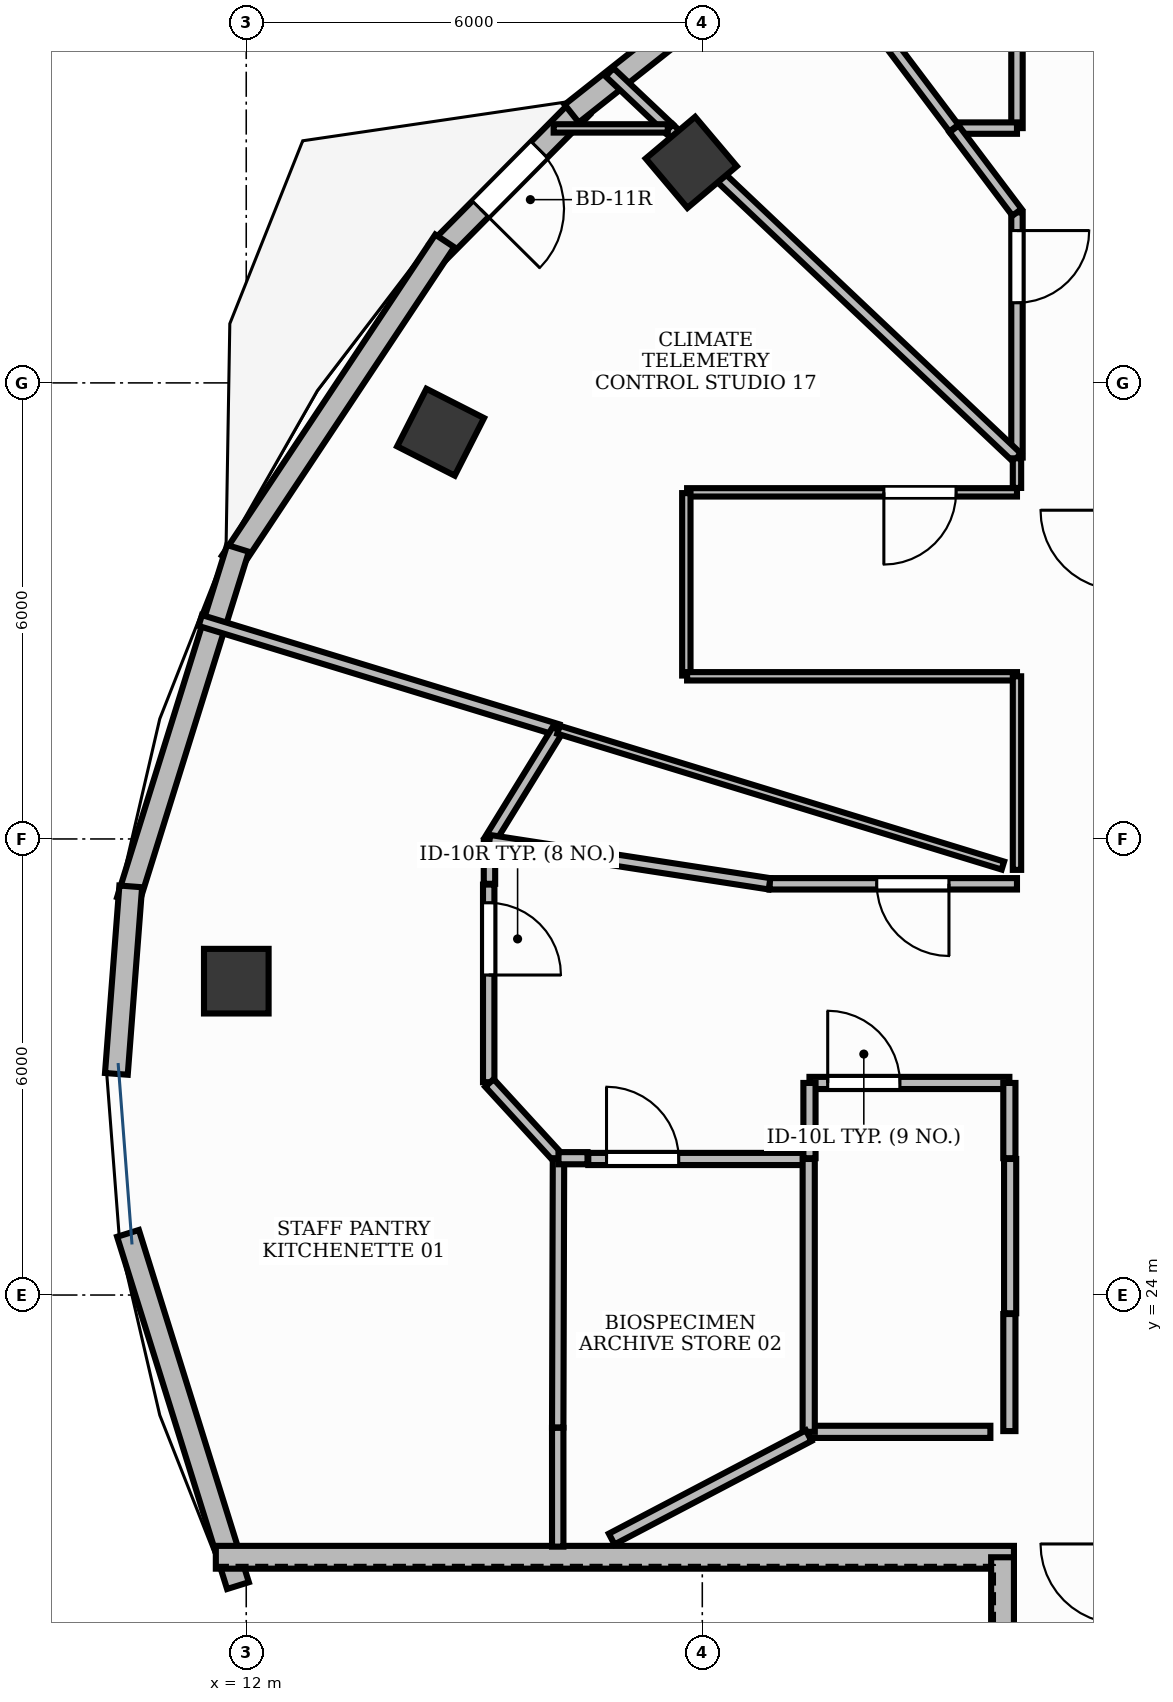
"""IFC4 building model, lengths in metres.
Left out: names, types, materials, properties, quantities, classifications, styles, units other than length and angle.
Written with IfcOpenShell. Run it as: python <this file> out.ifc"""

import sys

from ifc_helpers import new_model, si_unit, direction, frame, frame_2d, origin, origin_2d, place, context, subcontext, project, spatial, rectangle, extrude, element, fill, save


model = new_model("IFC4")
c1 = context("Model", 3, precision=1e-05, world=origin(), true_north=direction((0.0, 1.0)))
c2 = subcontext(c1, "Body", "Model", "MODEL_VIEW")
j1 = project(units=[si_unit("LENGTHUNIT", "METRE"), si_unit("PLANEANGLEUNIT", "RADIAN")], contexts=[c1])
p1 = place(None, origin())
s1 = spatial("IfcSite", under=j1, at=p1, CompositionType="ELEMENT")
p2 = place(p1, origin())
s2 = spatial("IfcBuilding", under=s1, at=p2, CompositionType="ELEMENT")
p3 = place(p2, frame((0.0, 0.0, 291.0)))
s3 = spatial("IfcBuildingStorey", under=s2, at=p3, CompositionType="ELEMENT", Elevation=291.0)
for number, where, z_axis, x_axis in (
    (1, (17.855, 38.901, -0.0), (0.0, 0.0, 1.0), (0.764, 0.645, 0.0)),
    (2, (14.557, 35.351, -0.0), (0.0, 0.0, 1.0), (0.453, 0.891, 0.0)),
    (3, (11.869, 28.129, -0.0), (0.0, 0.0, 1.0), (0.0, 1.0, 0.0)),
):
    element("IfcColumn", number, at=place(p3, frame(where, z_axis=z_axis, x_axis=x_axis)), inside=s3, PredefinedType="COLUMN", context=c2, shape_type="SweptSolid", body=[
        extrude(rectangle(XDim=0.85, YDim=0.85, at=origin_2d()), origin(), (0.0, 0.0, 1.0), 6.301),
    ])
p4 = place(p3, frame((16.414, 39.633, 0.0), z_axis=(0.0, 0.0, 1.0), x_axis=(-0.703783131399, -0.710414881572, 0.0)))
e4 = element("IfcWall", 4, at=p4, inside=s3, PredefinedType="STANDARD", context=c2, shape_type="SweptSolid", body=[
    extrude(rectangle(XDim=2.688, YDim=0.3, at=frame_2d((1.344, 0.0))), origin(), (0.0, 0.0, 1.0), 6.3),
])
p5 = place(p4, frame((0.794, 0.0, 0.0)))
e5 = element("IfcOpeningElement", 5, at=p5, cuts=e4, PredefinedType="OPENING", context=c2, shape_type="SweptSolid", body=[
    extrude(rectangle(XDim=1.1, YDim=2.15, at=frame_2d((0.55, 1.075))), frame((0.0, 0.165, 0.0), z_axis=(0.0, -1.0, 0.0), x_axis=(1.0, 0.0, 0.0)), (0.0, 0.0, 1.0), 0.33),
])
p6 = place(p3, frame((18.48, 41.283, 0.0), z_axis=(0.0, 0.0, 1.0), x_axis=(-0.784028163495, -0.620725252303, 0.0)))
e6 = element("IfcWall", 6, at=p6, inside=s3, PredefinedType="STANDARD", context=c2, shape_type="SweptSolid", body=[
    extrude(rectangle(XDim=2.803, YDim=0.3, at=frame_2d((1.402, 0.0))), origin(), (0.0, 0.0, 1.0), 5.87),
])
p7 = place(p3, frame((14.612, 37.868, 0.0), z_axis=(0.0, 0.0, 1.0), x_axis=(-0.553332864868, -0.832960227536, 0.0)))
e7 = element("IfcWall", 7, at=p7, inside=s3, PredefinedType="STANDARD", context=c2, shape_type="SweptSolid", body=[
    extrude(rectangle(XDim=5.071, YDim=0.3, at=frame_2d((2.535, 0.0))), origin(), (0.0, 0.0, 1.0), 6.3),
])
p8 = place(p3, frame((11.891, 33.823, 0.0), z_axis=(0.0, 0.0, 1.0), x_axis=(-0.297974306034, -0.954573890772, 0.0)))
e8 = element("IfcWall", 8, at=p8, inside=s3, PredefinedType="STANDARD", context=c2, shape_type="SweptSolid", body=[
    extrude(rectangle(XDim=4.854, YDim=0.3, at=frame_2d((2.427, 0.0))), origin(), (0.0, 0.0, 1.0), 6.3),
])
p9 = place(p3, frame((10.48, 29.376, 0.0), z_axis=(0.0, 0.0, 1.0), x_axis=(-0.076379552952, -0.997078815285, 0.0)))
e9 = element("IfcWall", 9, at=p9, inside=s3, PredefinedType="STANDARD", context=c2, shape_type="SweptSolid", body=[
    extrude(rectangle(XDim=2.474, YDim=0.3, at=frame_2d((1.237, 0.0))), origin(), (0.0, 0.0, 1.0), 6.3),
])
p10 = place(p3, frame((10.445, 24.811, 0.0), z_axis=(0.0, 0.0, 1.0), x_axis=(0.297974306034, -0.954573890772, 0.0)))
e10 = element("IfcWall", 10, at=p10, inside=s3, PredefinedType="STANDARD", context=c2, shape_type="SweptSolid", body=[
    extrude(rectangle(XDim=4.854, YDim=0.3, at=frame_2d((2.427, 0.0))), origin(), (0.0, 0.0, 1.0), 6.3),
])
p11 = place(p3, frame((11.6, 20.55, 0.0), z_axis=(0.0, 0.0, 1.0), x_axis=(1.0, 0.0, 0.0)))
e11 = element("IfcWall", 11, at=p11, inside=s3, PredefinedType="STANDARD", context=c2, shape_type="SweptSolid", body=[
    extrude(rectangle(XDim=10.5, YDim=0.3, at=frame_2d((5.25, 0.0))), origin(), (0.0, 0.0, 1.0), 6.3),
])
p12 = place(p3, frame((21.95, 9.4, 0.0), z_axis=(0.0, 0.0, 1.0), x_axis=(0.0, 1.0, 0.0)))
e12 = element("IfcWall", 12, at=p12, inside=s3, PredefinedType="STANDARD", context=c2, shape_type="SweptSolid", body=[
    extrude(rectangle(XDim=11.15, YDim=0.3, at=frame_2d((5.575, 0.0))), origin(), (0.0, 0.0, 1.0), 4.625),
])
p13 = place(p3, frame((19.41, 26.79, 0.0), z_axis=(0.0, 0.0, 1.0), x_axis=(1.0, 0.0, 0.0)))
e13 = element("IfcWall", 13, at=p13, inside=s3, PredefinedType="PARTITIONING", context=c2, shape_type="SweptSolid", body=[
    extrude(rectangle(XDim=2.63, YDim=0.16, at=frame_2d((1.315, 0.0))), origin(), (0.0, 0.0, 1.0), 4.61),
])
p14 = place(p13, frame((0.24, 0.0, 0.0)))
e14 = element("IfcOpeningElement", 14, at=p14, cuts=e13, PredefinedType="OPENING", context=c2, shape_type="SweptSolid", body=[
    extrude(rectangle(XDim=0.95, YDim=2.15, at=frame_2d((0.475, 1.075))), frame((0.0, 0.095, 0.0), z_axis=(0.0, -1.0, 0.0), x_axis=(1.0, 0.0, 0.0)), (0.0, 0.0, 1.0), 0.19),
])
p15 = place(p3, frame((15.19, 29.4, 0.0), z_axis=(0.0, 0.0, 1.0), x_axis=(0.0, -1.0, 0.0)))
e15 = element("IfcWall", 15, at=p15, inside=s3, PredefinedType="PARTITIONING", context=c2, shape_type="SweptSolid", body=[
    extrude(rectangle(XDim=2.6, YDim=0.15, at=frame_2d((1.3, 0.0))), origin(), (0.0, 0.0, 1.0), 4.61),
])
p16 = place(p15, frame((0.24, 0.0, 0.0)))
e16 = element("IfcOpeningElement", 16, at=p16, cuts=e15, PredefinedType="OPENING", context=c2, shape_type="SweptSolid", body=[
    extrude(rectangle(XDim=0.95, YDim=2.15, at=frame_2d((0.475, 1.075))), frame((0.0, 0.09, 0.0), z_axis=(0.0, -1.0, 0.0), x_axis=(1.0, 0.0, 0.0)), (0.0, 0.0, 1.0), 0.18),
])
p17 = place(p3, frame((16.5, 25.79, 0.0), z_axis=(0.0, 0.0, 1.0), x_axis=(1.0, 0.0, 0.0)))
e17 = element("IfcWall", 17, at=p17, inside=s3, PredefinedType="PARTITIONING", context=c2, shape_type="SweptSolid", body=[
    extrude(rectangle(XDim=2.89, YDim=0.16, at=frame_2d((1.445, 0.0))), origin(), (0.0, 0.0, 1.0), 4.61),
])
p18 = place(p17, frame((0.24, 0.0, 0.0)))
e18 = element("IfcOpeningElement", 18, at=p18, cuts=e17, PredefinedType="OPENING", context=c2, shape_type="SweptSolid", body=[
    extrude(rectangle(XDim=0.95, YDim=2.15, at=frame_2d((0.475, 1.075))), frame((0.0, 0.095, 0.0), z_axis=(0.0, -1.0, 0.0), x_axis=(1.0, 0.0, 0.0)), (0.0, 0.0, 1.0), 0.19),
])
p19 = place(p3, frame((22.14, 38.244, 0.0), z_axis=(0.0, 0.0, 1.0), x_axis=(0.0, -1.0, 0.0)))
e19 = element("IfcWall", 19, at=p19, inside=s3, PredefinedType="PARTITIONING", context=c2, shape_type="SweptSolid", body=[
    extrude(rectangle(XDim=3.226, YDim=0.15, at=frame_2d((1.613, 0.0))), origin(), (0.0, 0.0, 1.0), 4.61),
])
p20 = place(p19, frame((0.24, 0.0, 0.0)))
e20 = element("IfcOpeningElement", 20, at=p20, cuts=e19, PredefinedType="OPENING", context=c2, shape_type="SweptSolid", body=[
    extrude(rectangle(XDim=0.95, YDim=2.15, at=frame_2d((0.475, 1.075))), frame((0.0, 0.09, 0.0), z_axis=(0.0, -1.0, 0.0), x_axis=(1.0, 0.0, 0.0)), (0.0, 0.0, 1.0), 0.18),
])
p21 = place(p3, frame((22.14, 34.56, 0.0), z_axis=(0.0, 0.0, 1.0), x_axis=(-1.0, 0.0, 0.0)))
e21 = element("IfcWall", 21, at=p21, inside=s3, PredefinedType="MOVABLE", context=c2, shape_type="SweptSolid", body=[
    extrude(rectangle(XDim=4.34, YDim=0.11, at=frame_2d((2.17, 0.0))), origin(), (0.0, 0.0, 1.0), 4.61),
])
p22 = place(p21, frame((0.801, 0.0, 0.0)))
e22 = element("IfcOpeningElement", 22, at=p22, cuts=e21, PredefinedType="OPENING", context=c2, shape_type="SweptSolid", body=[
    extrude(rectangle(XDim=0.95, YDim=2.15, at=frame_2d((0.475, 1.075))), frame((0.0, 0.07, 0.0), z_axis=(0.0, -1.0, 0.0), x_axis=(1.0, 0.0, 0.0)), (0.0, 0.0, 1.0), 0.14),
])
p23 = place(p3, frame((22.14, 29.41, 0.0), z_axis=(0.0, 0.0, 1.0), x_axis=(-1.0, 0.0, 0.0)))
e23 = element("IfcWall", 23, at=p23, inside=s3, PredefinedType="PARTITIONING", context=c2, shape_type="SweptSolid", body=[
    extrude(rectangle(XDim=3.255, YDim=0.15, at=frame_2d((1.627, 0.0))), origin(), (0.0, 0.0, 1.0), 4.61),
])
p24 = place(p23, frame((0.895, 0.0, 0.0)))
e24 = element("IfcOpeningElement", 24, at=p24, cuts=e23, PredefinedType="OPENING", context=c2, shape_type="SweptSolid", body=[
    extrude(rectangle(XDim=0.95, YDim=2.15, at=frame_2d((0.475, 1.075))), frame((0.0, 0.09, 0.0), z_axis=(0.0, -1.0, 0.0), x_axis=(1.0, 0.0, 0.0)), (0.0, 0.0, 1.0), 0.18),
])
p25 = place(p3, frame((22.04, 23.75, 0.0), z_axis=(0.0, 0.0, 1.0), x_axis=(0.0, -1.0, 0.0)))
e25 = element("IfcWall", 25, at=p25, inside=s3, PredefinedType="PARTITIONING", context=c2, shape_type="SweptSolid", body=[
    extrude(rectangle(XDim=1.54, YDim=0.16, at=frame_2d((0.77, 0.0))), origin(), (0.0, 0.0, 1.0), 4.61),
])
p26 = place(p3, frame((21.79, 22.2, 0.0), z_axis=(0.0, 0.0, 1.0), x_axis=(-1.0, 0.0, 0.0)))
e26 = element("IfcWall", 26, at=p26, inside=s3, PredefinedType="PARTITIONING", context=c2, shape_type="SweptSolid", body=[
    extrude(rectangle(XDim=2.39, YDim=0.16, at=frame_2d((1.195, 0.0))), origin(), (0.0, 0.0, 1.0), 4.61),
])
p27 = place(p3, frame((19.4, 22.2, 0.0), z_axis=(0.0, 0.0, 1.0), x_axis=(0.0, 1.0, 0.0)))
e27 = element("IfcWall", 27, at=p27, inside=s3, PredefinedType="PARTITIONING", context=c2, shape_type="SweptSolid", body=[
    extrude(rectangle(XDim=3.59, YDim=0.16, at=frame_2d((1.795, 0.0))), origin(), (0.0, 0.0, 1.0), 4.61),
])
for number, where, z_axis, x_axis in (
    (28, (19.41, 25.8, 0.0), (0.0, 0.0, 1.0), (0.0, 1.0, 0.0)),
    (29, (22.04, 26.79, 0.0), (0.0, 0.0, 1.0), (0.0, -1.0, 0.0)),
):
    element("IfcWall", number, at=place(p3, frame(where, z_axis=z_axis, x_axis=x_axis)), inside=s3, PredefinedType="PARTITIONING", context=c2, shape_type="SweptSolid", body=[
        extrude(rectangle(XDim=0.99, YDim=0.16, at=frame_2d((0.495, 0.0))), origin(), (0.0, 0.0, 1.0), 4.61),
    ])
p28 = place(p3, frame((22.05, 25.79, 0.0), z_axis=(0.0, 0.0, 1.0), x_axis=(0.0, -1.0, 0.0)))
e30 = element("IfcWall", 30, at=p28, inside=s3, PredefinedType="PARTITIONING", context=c2, shape_type="SweptSolid", body=[
    extrude(rectangle(XDim=2.03, YDim=0.16, at=frame_2d((1.015, 0.0))), origin(), (0.0, 0.0, 1.0), 4.61),
])
p29 = place(p3, frame((11.395, 32.874, 0.0), z_axis=(0.0, 0.0, 1.0), x_axis=(0.956304539226, -0.292372413638, 0.0)))
e31 = element("IfcWall", 31, at=p29, inside=s3, PredefinedType="PARTITIONING", context=c2, shape_type="SweptSolid", body=[
    extrude(rectangle(XDim=4.917, YDim=0.15, at=frame_2d((2.459, 0.0))), origin(), (0.0, 0.0, 1.0), 4.61),
])
p30 = place(p3, frame((16.098, 31.436, 0.0), z_axis=(0.0, 0.0, 1.0), x_axis=(-0.52427238129, -0.851550626925, 0.0)))
e32 = element("IfcWall", 32, at=p30, inside=s3, PredefinedType="PARTITIONING", context=c2, shape_type="SweptSolid", body=[
    extrude(rectangle(XDim=1.713, YDim=0.15, at=frame_2d((0.856, 0.0))), origin(), (0.0, 0.0, 1.0), 4.61),
])
p31 = place(p3, frame((15.2, 29.978, 0.0), z_axis=(0.0, 0.0, 1.0), x_axis=(0.0, -1.0, 0.0)))
e33 = element("IfcWall", 33, at=p31, inside=s3, PredefinedType="PARTITIONING", context=c2, shape_type="SweptSolid", body=[
    extrude(rectangle(XDim=0.568, YDim=0.15, at=frame_2d((0.284, 0.0))), origin(), (0.0, 0.0, 1.0), 4.61),
])
p32 = place(p3, frame((15.2, 26.79, 0.0), z_axis=(0.0, 0.0, 1.0), x_axis=(0.675913896559, -0.736980599771, 0.0)))
e34 = element("IfcWall", 34, at=p32, inside=s3, PredefinedType="PARTITIONING", context=c2, shape_type="SweptSolid", body=[
    extrude(rectangle(XDim=1.343, YDim=0.15, at=frame_2d((0.672, 0.0))), origin(), (0.0, 0.0, 1.0), 4.61),
])
p33 = place(p3, frame((16.108, 25.8, 0.0), z_axis=(0.0, 0.0, 1.0), x_axis=(-0.002825236795, -0.999996009011, 0.0)))
e35 = element("IfcWall", 35, at=p33, inside=s3, PredefinedType="PARTITIONING", context=c2, shape_type="SweptSolid", body=[
    extrude(rectangle(XDim=3.543, YDim=0.15, at=frame_2d((1.771, 0.0))), origin(), (0.0, 0.0, 1.0), 4.61),
])
p34 = place(p3, frame((16.098, 22.253, 0.0), z_axis=(0.0, 0.0, 1.0), x_axis=(0.0, -1.0, 0.0)))
e36 = element("IfcWall", 36, at=p34, inside=s3, PredefinedType="PARTITIONING", context=c2, shape_type="SweptSolid", body=[
    extrude(rectangle(XDim=1.562, YDim=0.15, at=frame_2d((0.781, 0.0))), origin(), (0.0, 0.0, 1.0), 4.61),
])
p35 = place(p3, frame((16.108, 25.8, 0.0), z_axis=(0.0, 0.0, 1.0), x_axis=(1.0, 0.0, 0.0)))
e37 = element("IfcWall", 37, at=p35, inside=s3, PredefinedType="PARTITIONING", context=c2, shape_type="SweptSolid", body=[
    extrude(rectangle(XDim=0.382, YDim=0.16, at=frame_2d((0.191, 0.0))), origin(), (0.0, 0.0, 1.0), 4.61),
])
p36 = place(p3, frame((19.4, 22.15, 0.0), z_axis=(0.0, 0.0, 1.0), x_axis=(-0.885480277224, -0.464676961606, 0.0)))
e38 = element("IfcWall", 38, at=p36, inside=s3, PredefinedType="PARTITIONING", context=c2, shape_type="SweptSolid", body=[
    extrude(rectangle(XDim=2.927, YDim=0.16, at=frame_2d((1.463, 0.0))), origin(), (0.0, 0.0, 1.0), 4.61),
])
p37 = place(p3, frame((22.14, 40.75, 0.0), z_axis=(0.0, 0.0, 1.0), x_axis=(0.0, -1.0, 0.0)))
e39 = element("IfcWall", 39, at=p37, inside=s3, PredefinedType="PARTITIONING", context=c2, shape_type="SweptSolid", body=[
    extrude(rectangle(XDim=1.398, YDim=0.15, at=frame_2d((0.699, 0.0))), origin(), (0.0, 0.0, 1.0), 4.61),
])
p38 = place(p3, frame((22.14, 39.352, 0.0), z_axis=(0.0, 0.0, 1.0), x_axis=(-1.0, 0.0, 0.0)))
e40 = element("IfcWall", 40, at=p38, inside=s3, PredefinedType="PARTITIONING", context=c2, shape_type="SweptSolid", body=[
    extrude(rectangle(XDim=0.83, YDim=0.15, at=frame_2d((0.415, 0.0))), origin(), (0.0, 0.0, 1.0), 4.61),
])
p39 = place(p3, frame((21.31, 39.352, 0.0), z_axis=(0.0, 0.0, 1.0), x_axis=(-0.601810040337, 0.798639264843, 0.0)))
e41 = element("IfcWall", 41, at=p39, inside=s3, PredefinedType="PARTITIONING", context=c2, shape_type="SweptSolid", body=[
    extrude(rectangle(XDim=3.256, YDim=0.15, at=frame_2d((1.628, 0.0))), origin(), (0.0, 0.0, 1.0), 4.61),
])
p40 = place(p3, frame((21.312, 39.342, 0.0), z_axis=(0.0, 0.0, 1.0), x_axis=(0.601759967569, -0.79867699443, 0.0)))
e42 = element("IfcWall", 42, at=p40, inside=s3, PredefinedType="PARTITIONING", context=c2, shape_type="SweptSolid", body=[
    extrude(rectangle(XDim=1.375, YDim=0.15, at=frame_2d((0.688, 0.0))), origin(), (0.0, 0.0, 1.0), 4.61),
])
p41 = place(p3, frame((22.14, 35.018, 0.0), z_axis=(0.0, 0.0, 1.0), x_axis=(-0.726568240796, 0.68709431046, 0.0)))
e43 = element("IfcWall", 43, at=p41, inside=s3, PredefinedType="PARTITIONING", context=c2, shape_type="SweptSolid", body=[
    extrude(rectangle(XDim=6.302, YDim=0.15, at=frame_2d((3.151, 0.0))), origin(), (0.0, 0.0, 1.0), 4.61),
])
p42 = place(p3, frame((17.556, 39.352, 0.0), z_axis=(0.0, 0.0, 1.0), x_axis=(-0.726468416955, 0.687199853876, 0.0)))
e44 = element("IfcWall", 44, at=p42, inside=s3, PredefinedType="PARTITIONING", context=c2, shape_type="SweptSolid", body=[
    extrude(rectangle(XDim=1.069, YDim=0.15, at=frame_2d((0.535, 0.0))), origin(), (0.0, 0.0, 1.0), 4.61),
])
p43 = place(p3, frame((16.045, 39.348, 0.0), z_axis=(0.0, 0.0, 1.0), x_axis=(1.0, 0.0, 0.0)))
e45 = element("IfcWall", 45, at=p43, inside=s3, PredefinedType="MOVABLE", context=c2, shape_type="SweptSolid", body=[
    extrude(rectangle(XDim=1.501, YDim=0.11, at=frame_2d((0.751, 0.0))), origin(), (0.0, 0.0, 1.0), 4.61),
])
p44 = place(p3, frame((22.14, 35.008, 0.0), z_axis=(0.0, 0.0, 1.0), x_axis=(0.0, -1.0, 0.0)))
e46 = element("IfcWall", 46, at=p44, inside=s3, PredefinedType="MOVABLE", context=c2, shape_type="SweptSolid", body=[
    extrude(rectangle(XDim=0.39, YDim=0.11, at=frame_2d((0.195, 0.0))), origin(), (0.0, 0.0, 1.0), 4.61),
])
p45 = place(p3, frame((17.79, 34.55, 0.0), z_axis=(0.0, 0.0, 1.0), x_axis=(0.0, -1.0, 0.0)))
e47 = element("IfcWall", 47, at=p45, inside=s3, PredefinedType="MOVABLE", context=c2, shape_type="SweptSolid", body=[
    extrude(rectangle(XDim=2.4, YDim=0.11, at=frame_2d((1.2, 0.0))), origin(), (0.0, 0.0, 1.0), 4.61),
])
p46 = place(p3, frame((17.8, 32.14, 0.0), z_axis=(0.0, 0.0, 1.0), x_axis=(1.0, 0.0, 0.0)))
e48 = element("IfcWall", 48, at=p46, inside=s3, PredefinedType="MOVABLE", context=c2, shape_type="SweptSolid", body=[
    extrude(rectangle(XDim=4.34, YDim=0.11, at=frame_2d((2.17, 0.0))), origin(), (0.0, 0.0, 1.0), 4.61),
])
p47 = place(p3, frame((22.14, 32.14, 0.0), z_axis=(0.0, 0.0, 1.0), x_axis=(0.0, -1.0, 0.0)))
e49 = element("IfcWall", 49, at=p47, inside=s3, PredefinedType="MOVABLE", context=c2, shape_type="SweptSolid", body=[
    extrude(rectangle(XDim=2.547, YDim=0.11, at=frame_2d((1.273, 0.0))), origin(), (0.0, 0.0, 1.0), 4.61),
])
p48 = place(p3, frame((21.955, 29.65, 0.0), z_axis=(0.0, 0.0, 1.0), x_axis=(-0.956300718174, 0.292384911411, 0.0)))
e50 = element("IfcWall", 50, at=p48, inside=s3, PredefinedType="MOVABLE", context=c2, shape_type="SweptSolid", body=[
    extrude(rectangle(XDim=6.114, YDim=0.11, at=frame_2d((3.057, 0.0))), origin(), (0.0, 0.0, 1.0), 4.61),
])
p49 = place(p3, frame((18.885, 29.41, 0.0), z_axis=(0.0, 0.0, 1.0), x_axis=(-0.988332299131, 0.152313054249, 0.0)))
e51 = element("IfcWall", 51, at=p49, inside=s3, PredefinedType="PARTITIONING", context=c2, shape_type="SweptSolid", body=[
    extrude(rectangle(XDim=3.728, YDim=0.15, at=frame_2d((1.864, 0.0))), origin(), (0.0, 0.0, 1.0), 4.61),
])
p50 = place(p5, origin())
e52 = element("IfcDoor", 52, at=p50, inside=s3, OperationType="SINGLE_SWING_RIGHT", PredefinedType="DOOR", context=c2, shape_type="SweptSolid", body=[
    extrude(rectangle(XDim=1.1, YDim=2.15, at=frame_2d((0.55, 1.075))), frame((0.0, 0.025, 0.0), z_axis=(0.0, -1.0, 0.0), x_axis=(1.0, 0.0, 0.0)), (0.0, 0.0, 1.0), 0.05),
])
fill(e5, e52)
p51 = place(p14, origin())
e53 = element("IfcDoor", 53, at=p51, inside=s3, OperationType="SINGLE_SWING_LEFT", PredefinedType="DOOR", context=c2, shape_type="SweptSolid", body=[
    extrude(rectangle(XDim=0.95, YDim=2.15, at=frame_2d((0.475, 1.075))), frame((0.0, 0.025, 0.0), z_axis=(0.0, -1.0, 0.0), x_axis=(1.0, 0.0, 0.0)), (0.0, 0.0, 1.0), 0.05),
])
fill(e14, e53)
p52 = place(p16, origin())
e54 = element("IfcDoor", 54, at=p52, inside=s3, OperationType="SINGLE_SWING_RIGHT", PredefinedType="DOOR", context=c2, shape_type="SweptSolid", body=[
    extrude(rectangle(XDim=0.95, YDim=2.15, at=frame_2d((0.475, 1.075))), frame((0.0, 0.025, 0.0), z_axis=(0.0, -1.0, 0.0), x_axis=(1.0, 0.0, 0.0)), (0.0, 0.0, 1.0), 0.05),
])
fill(e16, e54)
p53 = place(p18, origin())
e55 = element("IfcDoor", 55, at=p53, inside=s3, OperationType="SINGLE_SWING_LEFT", PredefinedType="DOOR", context=c2, shape_type="SweptSolid", body=[
    extrude(rectangle(XDim=0.95, YDim=2.15, at=frame_2d((0.475, 1.075))), frame((0.0, 0.025, 0.0), z_axis=(0.0, -1.0, 0.0), x_axis=(1.0, 0.0, 0.0)), (0.0, 0.0, 1.0), 0.05),
])
fill(e18, e55)
p54 = place(p20, origin())
e56 = element("IfcDoor", 56, at=p54, inside=s3, OperationType="SINGLE_SWING_LEFT", PredefinedType="DOOR", context=c2, shape_type="SweptSolid", body=[
    extrude(rectangle(XDim=0.95, YDim=2.15, at=frame_2d((0.475, 1.075))), frame((0.0, 0.025, 0.0), z_axis=(0.0, -1.0, 0.0), x_axis=(1.0, 0.0, 0.0)), (0.0, 0.0, 1.0), 0.05),
])
fill(e20, e56)
p55 = place(p22, origin())
e57 = element("IfcDoor", 57, at=p55, inside=s3, OperationType="SINGLE_SWING_RIGHT", PredefinedType="DOOR", context=c2, shape_type="SweptSolid", body=[
    extrude(rectangle(XDim=0.95, YDim=2.15, at=frame_2d((0.475, 1.075))), frame((0.0, 0.025, 0.0), z_axis=(0.0, -1.0, 0.0), x_axis=(1.0, 0.0, 0.0)), (0.0, 0.0, 1.0), 0.05),
])
fill(e22, e57)
p56 = place(p24, origin())
e58 = element("IfcDoor", 58, at=p56, inside=s3, OperationType="SINGLE_SWING_LEFT", PredefinedType="DOOR", context=c2, shape_type="SweptSolid", body=[
    extrude(rectangle(XDim=0.95, YDim=2.15, at=frame_2d((0.475, 1.075))), frame((0.0, 0.025, 0.0), z_axis=(0.0, -1.0, 0.0), x_axis=(1.0, 0.0, 0.0)), (0.0, 0.0, 1.0), 0.05),
])
fill(e24, e58)
save(model, sys.argv[1])
